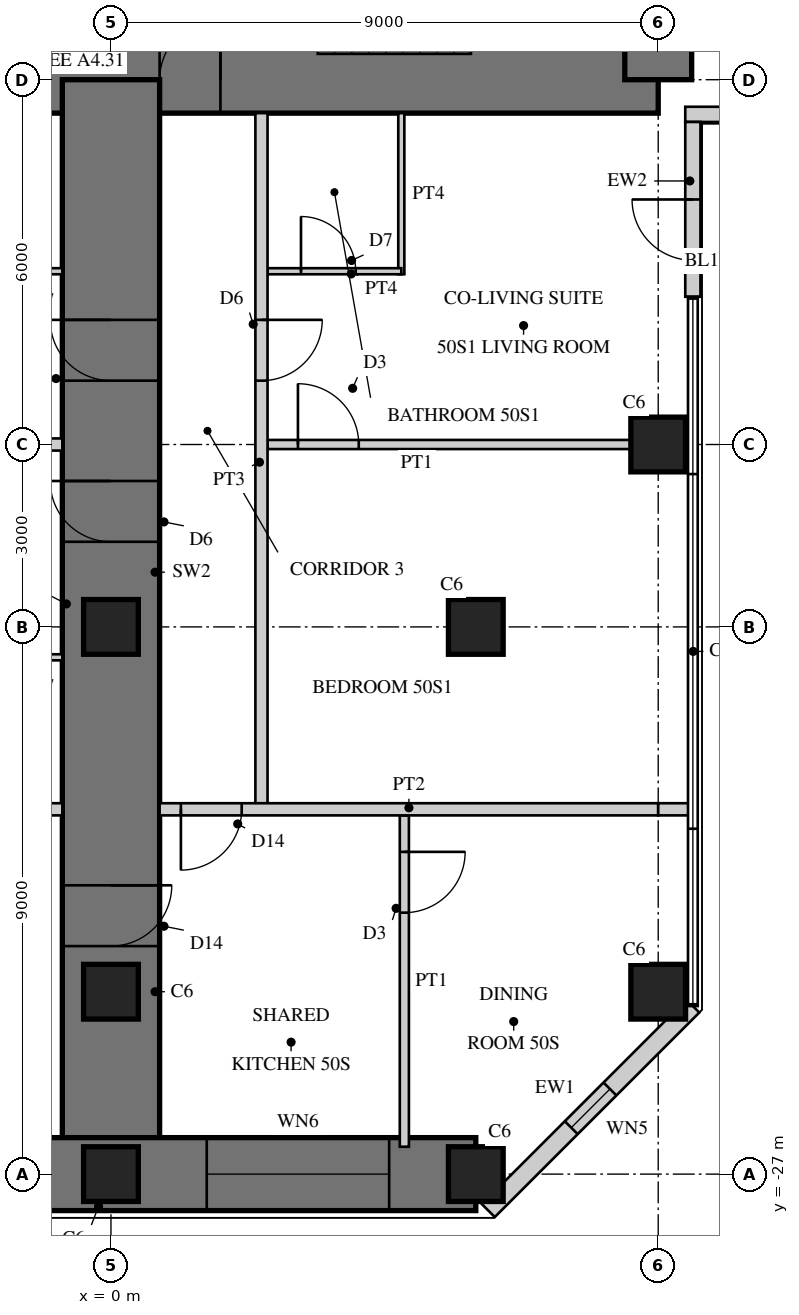
"""IFC4 building model, lengths in metres.
Left out: names, types, materials, properties, quantities, classifications, styles, units other than length and angle.
Written with IfcOpenShell. Run it as: python <this file> out.ifc"""

import sys

from ifc_helpers import new_model, si_unit, direction, frame, frame_2d, origin, origin_2d, place, context, subcontext, project, spatial, rectangle, hollow_rectangle, extrude, element, fill, save


model = new_model("IFC4")
c1 = context("Model", 3, precision=1e-05, world=origin(), true_north=direction((0.0, 1.0)))
c2 = subcontext(c1, "Body", "Model", "MODEL_VIEW")
j1 = project(units=[si_unit("LENGTHUNIT", "METRE"), si_unit("PLANEANGLEUNIT", "RADIAN")], contexts=[c1])
p1 = place(None, origin())
s1 = spatial("IfcSite", under=j1, at=p1, CompositionType="ELEMENT")
p2 = place(p1, origin())
s2 = spatial("IfcBuilding", under=s1, at=p2, CompositionType="ELEMENT")
p3 = place(p2, frame((0.0, 0.0, 200.1)))
s3 = spatial("IfcBuildingStorey", under=s2, at=p3, CompositionType="ELEMENT", Elevation=200.1)
p4 = place(p3, frame((-9.0, -9.0, 0.0), z_axis=(0.0, 0.0, 1.0), x_axis=(1.0, 0.0, 0.0)))
e1 = element("IfcWall", 1, at=p4, inside=s3, PredefinedType="SHEAR", context=c2, shape_type="SweptSolid", body=[
    extrude(rectangle(XDim=18.0, YDim=1.1, at=frame_2d((9.0, 0.0))), origin(), (0.0, 0.0, 1.0), 3.4),
])
p5 = place(p4, frame((9.8, 0.0, 0.0)))
e2 = element("IfcOpeningElement", 2, at=p5, cuts=e1, PredefinedType="OPENING", context=c2, shape_type="SweptSolid", body=[
    extrude(rectangle(XDim=1.0, YDim=2.4, at=frame_2d((0.5, 1.2))), frame((0.0, 0.56, 0.0), z_axis=(0.0, -1.0, 0.0), x_axis=(1.0, 0.0, 0.0)), (0.0, 0.0, 1.0), 1.12),
])
p6 = place(p3, frame((9.0, -9.0, 0.0), z_axis=(0.0, 0.0, 1.0), x_axis=(0.0, 1.0, 0.0)))
e3 = element("IfcWall", 3, at=p6, inside=s3, PredefinedType="SHEAR", context=c2, shape_type="SweptSolid", body=[
    extrude(rectangle(XDim=18.0, YDim=1.1, at=frame_2d((9.0, 0.0))), origin(), (0.0, 0.0, 1.0), 3.4),
])
p7 = place(p6, frame((9.8, 0.0, 0.0)))
e4 = element("IfcOpeningElement", 4, at=p7, cuts=e3, PredefinedType="OPENING", context=c2, shape_type="SweptSolid", body=[
    extrude(rectangle(XDim=1.0, YDim=2.4, at=frame_2d((0.5, 1.2))), frame((0.0, 0.56, 0.0), z_axis=(0.0, -1.0, 0.0), x_axis=(1.0, 0.0, 0.0)), (0.0, 0.0, 1.0), 1.12),
])
p8 = place(p3, frame((0.0, -9.0, 0.0), z_axis=(0.0, 0.0, 1.0), x_axis=(0.0, -1.0, 0.0)))
e5 = element("IfcWall", 5, at=p8, inside=s3, PredefinedType="SHEAR", context=c2, shape_type="SweptSolid", body=[
    extrude(rectangle(XDim=18.0, YDim=1.6, at=frame_2d((9.0, 0.0))), origin(), (0.0, 0.0, 1.0), 3.4),
])
p9 = place(p8, frame((3.95, 0.0, 0.0)))
e6 = element("IfcOpeningElement", 6, at=p9, cuts=e5, PredefinedType="OPENING", context=c2, shape_type="SweptSolid", body=[
    extrude(rectangle(XDim=1.0, YDim=2.15, at=frame_2d((0.5, 1.075))), frame((0.0, 0.81, 0.0), z_axis=(0.0, -1.0, 0.0), x_axis=(1.0, 0.0, 0.0)), (0.0, 0.0, 1.0), 1.62),
])
p10 = place(p8, frame((6.6, 0.0, 0.0)))
e7 = element("IfcOpeningElement", 7, at=p10, cuts=e5, PredefinedType="OPENING", context=c2, shape_type="SweptSolid", body=[
    extrude(rectangle(XDim=1.0, YDim=2.15, at=frame_2d((0.5, 1.075))), frame((0.0, 0.81, 0.0), z_axis=(0.0, -1.0, 0.0), x_axis=(1.0, 0.0, 0.0)), (0.0, 0.0, 1.0), 1.62),
])
p11 = place(p8, frame((13.25, 0.0, 0.0)))
e8 = element("IfcOpeningElement", 8, at=p11, cuts=e5, PredefinedType="OPENING", context=c2, shape_type="SweptSolid", body=[
    extrude(rectangle(XDim=1.0, YDim=2.2, at=frame_2d((0.5, 1.1))), frame((0.0, 0.81, 0.0), z_axis=(0.0, -1.0, 0.0), x_axis=(1.0, 0.0, 0.0)), (0.0, 0.0, 1.0), 1.62),
])
p12 = place(p3, frame((-6.0, -27.0, 0.0), z_axis=(0.0, 0.0, 1.0), x_axis=(1.0, 0.0, 0.0)))
e9 = element("IfcWall", 9, at=p12, inside=s3, PredefinedType="SHEAR", context=c2, shape_type="SweptSolid", body=[
    extrude(rectangle(XDim=12.0, YDim=1.2, at=frame_2d((6.0, 0.0))), origin(), (0.0, 0.0, 1.0), 3.4),
])
p13 = place(p12, frame((1.425, 0.0, 0.6)))
e10 = element("IfcOpeningElement", 10, at=p13, cuts=e9, PredefinedType="OPENING", context=c2, shape_type="SweptSolid", body=[
    extrude(rectangle(XDim=3.0, YDim=2.4, at=frame_2d((1.5, 1.2))), frame((0.0, 0.61, 0.0), z_axis=(0.0, -1.0, 0.0), x_axis=(1.0, 0.0, 0.0)), (0.0, 0.0, 1.0), 1.22),
])
p14 = place(p12, frame((7.575, 0.0, 0.6)))
e11 = element("IfcOpeningElement", 11, at=p14, cuts=e9, PredefinedType="OPENING", context=c2, shape_type="SweptSolid", body=[
    extrude(rectangle(XDim=3.0, YDim=2.4, at=frame_2d((1.5, 1.2))), frame((0.0, 0.61, 0.0), z_axis=(0.0, -1.0, 0.0), x_axis=(1.0, 0.0, 0.0)), (0.0, 0.0, 1.0), 1.22),
])
for number, where, z_axis, x_axis in (
    (12, (9.0, -15.0, 0.0), (0.0, 0.0, 1.0), (1.0, 0.0, 0.0)),
    (13, (9.0, -24.0, 0.0), (0.0, 0.0, 1.0), (1.0, 0.0, 0.0)),
    (14, (0.0, -27.0, 0.0), (0.0, 0.0, 1.0), (1.0, 0.0, 0.0)),
    (15, (6.0, -27.0, 0.0), (0.0, 0.0, 1.0), (1.0, 0.0, 0.0)),
    (16, (0.0, -18.0, 0.0), (0.0, 0.0, 1.0), (1.0, 0.0, 0.0)),
    (17, (6.0, -18.0, 0.0), (0.0, 0.0, 1.0), (1.0, 0.0, 0.0)),
    (18, (0.0, -24.0, 0.0), (0.0, 0.0, 1.0), (1.0, 0.0, 0.0)),
):
    element("IfcColumn", number, at=place(p3, frame(where, z_axis=z_axis, x_axis=x_axis)), inside=s3, PredefinedType="COLUMN", context=c2, shape_type="SweptSolid", body=[
        extrude(rectangle(XDim=0.9, YDim=0.9, at=origin_2d()), origin(), (0.0, 0.0, 1.0), 3.4),
    ])
p15 = place(p3, frame((9.445, -9.57, 0.0), z_axis=(0.0, 0.0, 1.0), x_axis=(1.0, 0.0, 0.0)))
e19 = element("IfcWall", 19, at=p15, inside=s3, PredefinedType="SOLIDWALL", context=c2, shape_type="SweptSolid", body=[
    extrude(rectangle(XDim=3.125, YDim=0.25, at=frame_2d((1.562, 0.0))), origin(), (0.0, 0.0, 1.0), 3.22),
])
p16 = place(p15, frame((0.6, 0.0, 0.0)))
e20 = element("IfcOpeningElement", 20, at=p16, cuts=e19, PredefinedType="OPENING", context=c2, shape_type="SweptSolid", body=[
    extrude(rectangle(XDim=1.0, YDim=2.2, at=frame_2d((0.5, 1.1))), frame((0.0, 0.135, 0.0), z_axis=(0.0, -1.0, 0.0), x_axis=(1.0, 0.0, 0.0)), (0.0, 0.0, 1.0), 0.27),
])
p17 = place(p3, frame((6.206, -27.6, 0.0), z_axis=(0.0, 0.0, 1.0), x_axis=(0.707106781187, 0.707106781187, 0.0)))
e21 = element("IfcWall", 21, at=p17, inside=s3, PredefinedType="SOLIDWALL", context=c2, shape_type="SweptSolid", body=[
    extrude(rectangle(XDim=4.757, YDim=0.3, at=frame_2d((2.379, 0.0))), origin(), (0.0, 0.0, 1.0), 3.22),
])
p18 = place(p17, frame((1.929, 0.0, 0.3)))
e22 = element("IfcOpeningElement", 22, at=p18, cuts=e21, PredefinedType="OPENING", context=c2, shape_type="SweptSolid", body=[
    extrude(rectangle(XDim=0.9, YDim=2.4, at=frame_2d((0.45, 1.2))), frame((0.0, 0.16, 0.0), z_axis=(0.0, -1.0, 0.0), x_axis=(1.0, 0.0, 0.0)), (0.0, 0.0, 1.0), 0.32),
])
p19 = place(p3, frame((9.57, -12.57, 0.0), z_axis=(0.0, 0.0, 1.0), x_axis=(0.0, 1.0, 0.0)))
e23 = element("IfcWall", 23, at=p19, inside=s3, PredefinedType="SOLIDWALL", context=c2, shape_type="SweptSolid", body=[
    extrude(rectangle(XDim=2.875, YDim=0.25, at=frame_2d((1.438, 0.0))), origin(), (0.0, 0.0, 1.0), 3.22),
])
p20 = place(p19, frame((0.6, 0.0, 0.0)))
e24 = element("IfcOpeningElement", 24, at=p20, cuts=e23, PredefinedType="OPENING", context=c2, shape_type="SweptSolid", body=[
    extrude(rectangle(XDim=1.0, YDim=2.2, at=frame_2d((0.5, 1.1))), frame((0.0, 0.135, 0.0), z_axis=(0.0, -1.0, 0.0), x_axis=(1.0, 0.0, 0.0)), (0.0, 0.0, 1.0), 0.27),
])
p21 = place(p3, frame((4.775, -9.55, 0.0), z_axis=(0.0, 0.0, 1.0), x_axis=(0.0, -1.0, 0.0)))
e25 = element("IfcWall", 25, at=p21, inside=s3, PredefinedType="PARTITIONING", context=c2, shape_type="SweptSolid", body=[
    extrude(rectangle(XDim=2.65, YDim=0.1, at=frame_2d((1.325, 0.0))), origin(), (0.0, 0.0, 1.0), 3.22),
])
p22 = place(p3, frame((2.575, -12.15, 0.0), z_axis=(0.0, 0.0, 1.0), x_axis=(1.0, 0.0, 0.0)))
e26 = element("IfcWall", 26, at=p22, inside=s3, PredefinedType="PARTITIONING", context=c2, shape_type="SweptSolid", body=[
    extrude(rectangle(XDim=2.2, YDim=0.1, at=frame_2d((1.1, 0.0))), origin(), (0.0, 0.0, 1.0), 3.22),
])
p23 = place(p22, frame((0.55, 0.0, 0.0)))
e27 = element("IfcOpeningElement", 27, at=p23, cuts=e26, PredefinedType="OPENING", context=c2, shape_type="SweptSolid", body=[
    extrude(rectangle(XDim=0.9, YDim=2.1, at=frame_2d((0.45, 1.05))), frame((0.0, 0.06, 0.0), z_axis=(0.0, -1.0, 0.0), x_axis=(1.0, 0.0, 0.0)), (0.0, 0.0, 1.0), 0.12),
])
p24 = place(p3, frame((2.575, -15.0, 0.0), z_axis=(0.0, 0.0, 1.0), x_axis=(1.0, 0.0, 0.0)))
e28 = element("IfcWall", 28, at=p24, inside=s3, PredefinedType="PARTITIONING", context=c2, shape_type="SweptSolid", body=[
    extrude(rectangle(XDim=5.975, YDim=0.15, at=frame_2d((2.988, 0.0))), origin(), (0.0, 0.0, 1.0), 2.47),
])
p25 = place(p24, frame((0.5, 0.0, 0.0)))
e29 = element("IfcOpeningElement", 29, at=p25, cuts=e28, PredefinedType="OPENING", context=c2, shape_type="SweptSolid", body=[
    extrude(rectangle(XDim=1.0, YDim=2.1, at=frame_2d((0.5, 1.05))), frame((0.0, 0.085, 0.0), z_axis=(0.0, -1.0, 0.0), x_axis=(1.0, 0.0, 0.0)), (0.0, 0.0, 1.0), 0.17),
])
p26 = place(p3, frame((-3.0, -12.15, 0.0), z_axis=(0.0, 0.0, 1.0), x_axis=(1.0, 0.0, 0.0)))
e30 = element("IfcWall", 30, at=p26, inside=s3, PredefinedType="PARTITIONING", context=c2, shape_type="SweptSolid", body=[
    extrude(rectangle(XDim=2.2, YDim=0.1, at=frame_2d((1.1, 0.0))), origin(), (0.0, 0.0, 1.0), 3.22),
])
p27 = place(p26, frame((0.55, 0.0, 0.0)))
e31 = element("IfcOpeningElement", 31, at=p27, cuts=e30, PredefinedType="OPENING", context=c2, shape_type="SweptSolid", body=[
    extrude(rectangle(XDim=0.9, YDim=2.1, at=frame_2d((0.45, 1.05))), frame((0.0, 0.06, 0.0), z_axis=(0.0, -1.0, 0.0), x_axis=(1.0, 0.0, 0.0)), (0.0, 0.0, 1.0), 0.12),
])
p28 = place(p3, frame((-8.55, -15.0, 0.0), z_axis=(0.0, 0.0, 1.0), x_axis=(1.0, 0.0, 0.0)))
e32 = element("IfcWall", 32, at=p28, inside=s3, PredefinedType="SOLIDWALL", context=c2, shape_type="SweptSolid", body=[
    extrude(rectangle(XDim=7.75, YDim=0.2, at=frame_2d((3.875, 0.0))), origin(), (0.0, 0.0, 1.0), 2.47),
])
p29 = place(p3, frame((-3.0, -18.5, 0.0), z_axis=(0.0, 0.0, 1.0), x_axis=(1.0, 0.0, 0.0)))
e33 = element("IfcWall", 33, at=p29, inside=s3, PredefinedType="PARTITIONING", context=c2, shape_type="SweptSolid", body=[
    extrude(rectangle(XDim=2.2, YDim=0.1, at=frame_2d((1.1, 0.0))), origin(), (0.0, 0.0, 1.0), 3.22),
])
p30 = place(p29, frame((0.55, 0.0, 0.0)))
e34 = element("IfcOpeningElement", 34, at=p30, cuts=e33, PredefinedType="OPENING", context=c2, shape_type="SweptSolid", body=[
    extrude(rectangle(XDim=0.9, YDim=2.1, at=frame_2d((0.45, 1.05))), frame((0.0, 0.06, 0.0), z_axis=(0.0, -1.0, 0.0), x_axis=(1.0, 0.0, 0.0)), (0.0, 0.0, 1.0), 0.12),
])
p31 = place(p3, frame((2.475, -9.55, 0.0), z_axis=(0.0, 0.0, 1.0), x_axis=(0.0, -1.0, 0.0)))
e35 = element("IfcWall", 35, at=p31, inside=s3, PredefinedType="SOLIDWALL", context=c2, shape_type="SweptSolid", body=[
    extrude(rectangle(XDim=11.45, YDim=0.2, at=frame_2d((5.725, 0.0))), origin(), (0.0, 0.0, 1.0), 3.22),
])
p32 = place(p31, frame((3.4, 0.0, 0.0)))
e36 = element("IfcOpeningElement", 36, at=p32, cuts=e35, PredefinedType="OPENING", context=c2, shape_type="SweptSolid", body=[
    extrude(rectangle(XDim=1.0, YDim=2.15, at=frame_2d((0.5, 1.075))), frame((0.0, 0.11, 0.0), z_axis=(0.0, -1.0, 0.0), x_axis=(1.0, 0.0, 0.0)), (0.0, 0.0, 1.0), 0.22),
])
p33 = place(p3, frame((4.825, -21.1, 0.0), z_axis=(0.0, 0.0, 1.0), x_axis=(0.0, -1.0, 0.0)))
e37 = element("IfcWall", 37, at=p33, inside=s3, PredefinedType="PARTITIONING", context=c2, shape_type="SweptSolid", body=[
    extrude(rectangle(XDim=5.45, YDim=0.15, at=frame_2d((2.725, 0.0))), origin(), (0.0, 0.0, 1.0), 3.22),
])
p34 = place(p33, frame((0.6, 0.0, 0.0)))
e38 = element("IfcOpeningElement", 38, at=p34, cuts=e37, PredefinedType="OPENING", context=c2, shape_type="SweptSolid", body=[
    extrude(rectangle(XDim=1.0, YDim=2.1, at=frame_2d((0.5, 1.05))), frame((0.0, 0.085, 0.0), z_axis=(0.0, -1.0, 0.0), x_axis=(1.0, 0.0, 0.0)), (0.0, 0.0, 1.0), 0.17),
])
p35 = place(p3, frame((-9.0, -21.0, 0.0), z_axis=(0.0, 0.0, 1.0), x_axis=(1.0, 0.0, 0.0)))
e39 = element("IfcWall", 39, at=p35, inside=s3, PredefinedType="SOLIDWALL", context=c2, shape_type="SweptSolid", body=[
    extrude(rectangle(XDim=8.2, YDim=0.2, at=frame_2d((4.1, 0.0))), origin(), (0.0, 0.0, 1.0), 2.62),
])
p36 = place(p3, frame((0.8, -21.0, 0.0), z_axis=(0.0, 0.0, 1.0), x_axis=(1.0, 0.0, 0.0)))
e40 = element("IfcWall", 40, at=p36, inside=s3, PredefinedType="SOLIDWALL", context=c2, shape_type="SweptSolid", body=[
    extrude(rectangle(XDim=8.2, YDim=0.2, at=frame_2d((4.1, 0.0))), origin(), (0.0, 0.0, 1.0), 2.62),
])
p37 = place(p36, frame((0.35, 0.0, 0.0)))
e41 = element("IfcOpeningElement", 41, at=p37, cuts=e40, PredefinedType="OPENING", context=c2, shape_type="SweptSolid", body=[
    extrude(rectangle(XDim=1.0, YDim=2.2, at=frame_2d((0.5, 1.1))), frame((0.0, 0.11, 0.0), z_axis=(0.0, -1.0, 0.0), x_axis=(1.0, 0.0, 0.0)), (0.0, 0.0, 1.0), 0.22),
])
p38 = place(p3, frame((9.0, -21.0, 0.0), z_axis=(0.0, 0.0, 1.0), x_axis=(1.0, 0.0, 0.0)))
e42 = element("IfcWall", 42, at=p38, inside=s3, PredefinedType="SOLIDWALL", context=c2, shape_type="SweptSolid", body=[
    extrude(rectangle(XDim=0.53, YDim=0.2, at=frame_2d((0.265, 0.0))), origin(), (0.0, 0.0, 1.0), 3.22),
])
p39 = place(p14, origin())
e43 = element("IfcWindow", 43, at=p39, inside=s3, PartitioningType="SINGLE_PANEL", PredefinedType="WINDOW", context=c2, shape_type="SweptSolid", body=[
    extrude(hollow_rectangle(XDim=3.0, YDim=2.4, WallThickness=0.06, at=frame_2d((1.5, 1.2))), frame((0.0, 0.03, 0.0), z_axis=(0.0, -1.0, 0.0), x_axis=(1.0, 0.0, 0.0)), (0.0, 0.0, 1.0), 0.06),
    extrude(rectangle(XDim=2.879, YDim=2.279, at=frame_2d((1.5, 1.2))), frame((0.0, 0.03, 0.0), z_axis=(0.0, -1.0, 0.0), x_axis=(1.0, 0.0, 0.0)), (0.0, 0.0, 1.0), 0.06),
])
fill(e11, e43)
p40 = place(p18, origin())
e44 = element("IfcWindow", 44, at=p40, inside=s3, PartitioningType="SINGLE_PANEL", PredefinedType="WINDOW", context=c2, shape_type="SweptSolid", body=[
    extrude(hollow_rectangle(XDim=0.9, YDim=2.4, WallThickness=0.06, at=frame_2d((0.45, 1.2))), frame((0.0, 0.03, 0.0), z_axis=(0.0, -1.0, 0.0), x_axis=(1.0, 0.0, 0.0)), (0.0, 0.0, 1.0), 0.06),
    extrude(rectangle(XDim=0.779, YDim=2.279, at=frame_2d((0.45, 1.2))), frame((0.0, 0.03, 0.0), z_axis=(0.0, -1.0, 0.0), x_axis=(1.0, 0.0, 0.0)), (0.0, 0.0, 1.0), 0.06),
])
fill(e22, e44)
p41 = place(p20, origin())
e45 = element("IfcDoor", 45, at=p41, inside=s3, OperationType="SINGLE_SWING_RIGHT", PredefinedType="DOOR", context=c2, shape_type="SweptSolid", body=[
    extrude(hollow_rectangle(XDim=1.0, YDim=2.2, WallThickness=0.06, at=frame_2d((0.5, 1.1))), frame((0.0, 0.025, 0.0), z_axis=(0.0, -1.0, 0.0), x_axis=(1.0, 0.0, 0.0)), (0.0, 0.0, 1.0), 0.05),
    extrude(rectangle(XDim=0.879, YDim=2.079, at=frame_2d((0.5, 1.1))), frame((0.0, 0.025, 0.0), z_axis=(0.0, -1.0, 0.0), x_axis=(1.0, 0.0, 0.0)), (0.0, 0.0, 1.0), 0.05),
])
fill(e24, e45)
p42 = place(p23, origin())
e46 = element("IfcDoor", 46, at=p42, inside=s3, OperationType="SINGLE_SWING_LEFT", PredefinedType="DOOR", context=c2, shape_type="SweptSolid", body=[
    extrude(rectangle(XDim=0.9, YDim=2.1, at=frame_2d((0.45, 1.05))), frame((0.0, 0.025, 0.0), z_axis=(0.0, -1.0, 0.0), x_axis=(1.0, 0.0, 0.0)), (0.0, 0.0, 1.0), 0.05),
])
fill(e27, e46)
p43 = place(p25, origin())
e47 = element("IfcDoor", 47, at=p43, inside=s3, OperationType="SINGLE_SWING_LEFT", PredefinedType="DOOR", context=c2, shape_type="SweptSolid", body=[
    extrude(rectangle(XDim=1.0, YDim=2.1, at=frame_2d((0.5, 1.05))), frame((0.0, 0.025, 0.0), z_axis=(0.0, -1.0, 0.0), x_axis=(1.0, 0.0, 0.0)), (0.0, 0.0, 1.0), 0.05),
])
fill(e29, e47)
p44 = place(p32, origin())
e48 = element("IfcDoor", 48, at=p44, inside=s3, OperationType="SINGLE_SWING_LEFT", PredefinedType="DOOR", context=c2, shape_type="SweptSolid", body=[
    extrude(rectangle(XDim=1.0, YDim=2.15, at=frame_2d((0.5, 1.075))), frame((0.0, 0.025, 0.0), z_axis=(0.0, -1.0, 0.0), x_axis=(1.0, 0.0, 0.0)), (0.0, 0.0, 1.0), 0.05),
])
fill(e36, e48)
p45 = place(p34, origin())
e49 = element("IfcDoor", 49, at=p45, inside=s3, OperationType="SINGLE_SWING_LEFT", PredefinedType="DOOR", context=c2, shape_type="SweptSolid", body=[
    extrude(rectangle(XDim=1.0, YDim=2.1, at=frame_2d((0.5, 1.05))), frame((0.0, 0.025, 0.0), z_axis=(0.0, -1.0, 0.0), x_axis=(1.0, 0.0, 0.0)), (0.0, 0.0, 1.0), 0.05),
])
fill(e38, e49)
p46 = place(p37, frame((1.0, 0.0, 0.0), z_axis=(0.0, 0.0, 1.0), x_axis=(-1.0, 0.0, 0.0)))
e50 = element("IfcDoor", 50, at=p46, inside=s3, OperationType="SINGLE_SWING_RIGHT", PredefinedType="DOOR", context=c2, shape_type="SweptSolid", body=[
    extrude(rectangle(XDim=1.0, YDim=2.2, at=frame_2d((0.5, 1.1))), frame((0.0, 0.025, 0.0), z_axis=(0.0, -1.0, 0.0), x_axis=(1.0, 0.0, 0.0)), (0.0, 0.0, 1.0), 0.05),
])
fill(e41, e50)
p47 = place(p9, frame((1.0, 0.0, 0.0), z_axis=(0.0, 0.0, 1.0), x_axis=(-1.0, 0.0, 0.0)))
e51 = element("IfcDoor", 51, at=p47, inside=s3, OperationType="SINGLE_SWING_RIGHT", PredefinedType="DOOR", context=c2, shape_type="SweptSolid", body=[
    extrude(rectangle(XDim=1.0, YDim=2.15, at=frame_2d((0.5, 1.075))), frame((0.0, 0.025, 0.0), z_axis=(0.0, -1.0, 0.0), x_axis=(1.0, 0.0, 0.0)), (0.0, 0.0, 1.0), 0.05),
])
fill(e6, e51)
p48 = place(p10, frame((1.0, 0.0, 0.0), z_axis=(0.0, 0.0, 1.0), x_axis=(-1.0, 0.0, 0.0)))
e52 = element("IfcDoor", 52, at=p48, inside=s3, OperationType="SINGLE_SWING_RIGHT", PredefinedType="DOOR", context=c2, shape_type="SweptSolid", body=[
    extrude(rectangle(XDim=1.0, YDim=2.15, at=frame_2d((0.5, 1.075))), frame((0.0, 0.025, 0.0), z_axis=(0.0, -1.0, 0.0), x_axis=(1.0, 0.0, 0.0)), (0.0, 0.0, 1.0), 0.05),
])
fill(e7, e52)
p49 = place(p11, origin())
e53 = element("IfcDoor", 53, at=p49, inside=s3, OperationType="SINGLE_SWING_LEFT", PredefinedType="DOOR", context=c2, shape_type="SweptSolid", body=[
    extrude(rectangle(XDim=1.0, YDim=2.2, at=frame_2d((0.5, 1.1))), frame((0.0, 0.025, 0.0), z_axis=(0.0, -1.0, 0.0), x_axis=(1.0, 0.0, 0.0)), (0.0, 0.0, 1.0), 0.05),
])
fill(e8, e53)
p50 = place(p5, origin())
e54 = element("IfcDoor", 54, at=p50, inside=s3, OperationType="SINGLE_SWING_RIGHT", PredefinedType="DOOR", context=c2, shape_type="SweptSolid", body=[
    extrude(rectangle(XDim=1.0, YDim=2.4, at=frame_2d((0.5, 1.2))), frame((0.0, 0.055, 0.0), z_axis=(0.0, -1.0, 0.0), x_axis=(1.0, 0.0, 0.0)), (0.0, 0.0, 1.0), 0.05),
])
fill(e2, e54)
save(model, sys.argv[1])
